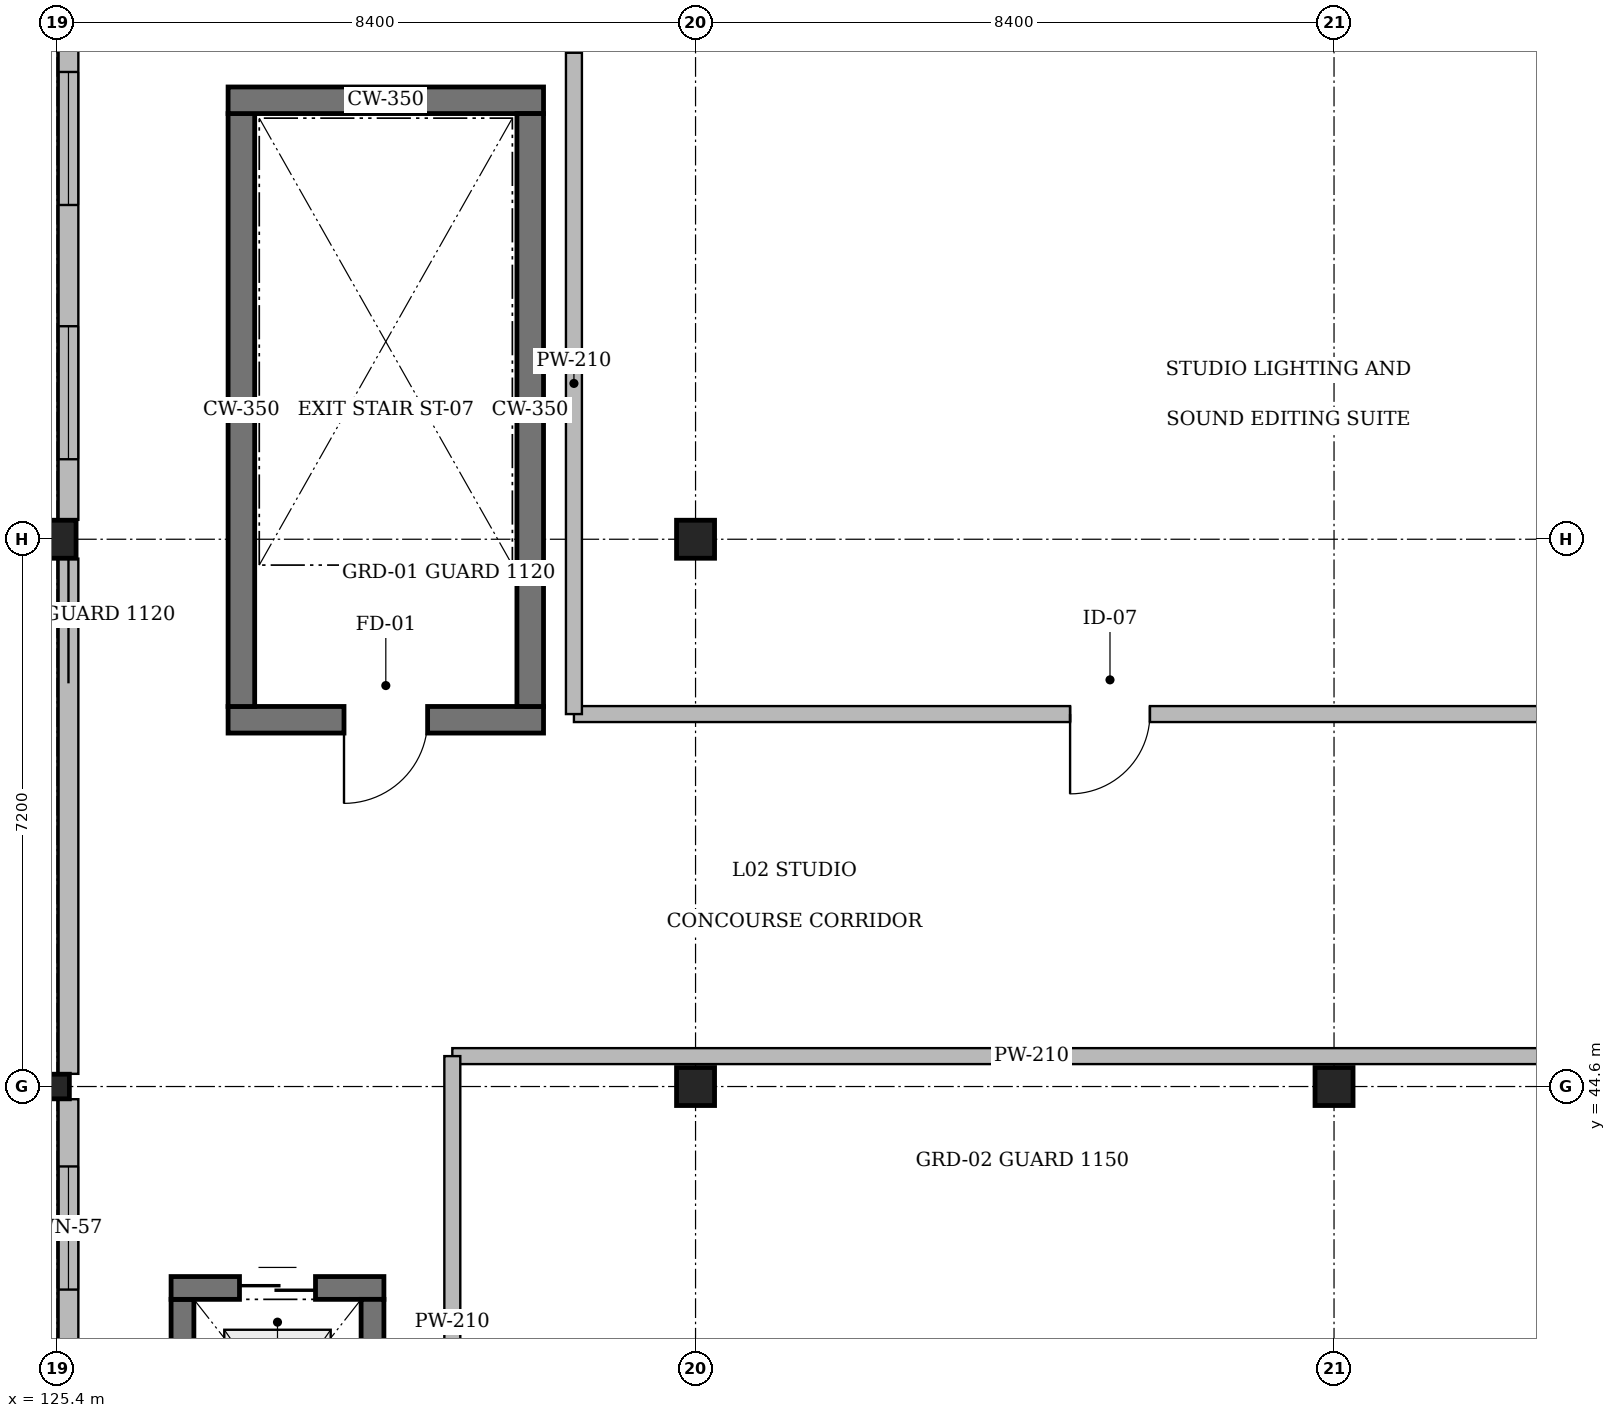
"""IFC4 building model, lengths in metres.
Left out: names, types, materials, properties, quantities, classifications, styles, units other than length and angle.
Written with IfcOpenShell. Run it as: python <this file> out.ifc"""

import sys

from ifc_helpers import new_model, si_unit, direction, frame, frame_2d, origin, origin_2d, place, context, subcontext, project, spatial, rectangle, hollow_circle, extrude, element, fill, save


model = new_model("IFC4")
c1 = context("Model", 3, precision=1e-05, world=origin(), true_north=direction((0.0, 1.0)))
c2 = subcontext(c1, "Body", "Model", "MODEL_VIEW")
j1 = project(units=[si_unit("LENGTHUNIT", "METRE"), si_unit("PLANEANGLEUNIT", "RADIAN")], contexts=[c1])
p1 = place(None, origin())
s1 = spatial("IfcSite", under=j1, at=p1, CompositionType="ELEMENT")
p2 = place(p1, origin())
s2 = spatial("IfcBuilding", under=s1, at=p2, CompositionType="ELEMENT")
p3 = place(p2, frame((0.0, 0.0, 9.0)))
s3 = spatial("IfcBuildingStorey", under=s2, at=p3, CompositionType="ELEMENT", Elevation=9.0)
p4 = place(p3, frame((125.4, 44.6, 0.0), z_axis=(0.0, 0.0, 1.0), x_axis=(1.0, 0.0, 0.0)))
e1 = element("IfcColumn", 1, at=p4, inside=s3, PredefinedType="COLUMN", context=c2, shape_type="SweptSolid", body=[
    extrude(hollow_circle(Radius=0.162, WallThickness=0.012, at=origin_2d()), origin(), (0.0, 0.0, 1.0), 4.06),
])
for number, where, z_axis, x_axis in (
    (2, (125.4, 51.8, 0.0), (0.0, 0.0, 1.0), (1.0, 0.0, 0.0)),
    (3, (133.8, 44.6, 0.0), (0.0, 0.0, 1.0), (1.0, 0.0, 0.0)),
    (4, (133.8, 51.8, 0.0), (0.0, 0.0, 1.0), (1.0, 0.0, 0.0)),
    (5, (142.2, 44.6, 0.0), (0.0, 0.0, 1.0), (1.0, 0.0, 0.0)),
):
    element("IfcColumn", number, at=place(p3, frame(where, z_axis=z_axis, x_axis=x_axis)), inside=s3, PredefinedType="COLUMN", context=c2, shape_type="SweptSolid", body=[
        extrude(rectangle(XDim=0.5, YDim=0.5, at=origin_2d()), origin(), (0.0, 0.0, 1.0), 4.06),
    ])
p5 = place(p3, frame((131.8, 49.425, 0.0), z_axis=(0.0, 0.0, 1.0), x_axis=(-1.0, 0.0, 0.0)))
e6 = element("IfcWall", 6, at=p5, inside=s3, PredefinedType="SOLIDWALL", context=c2, shape_type="SweptSolid", body=[
    extrude(rectangle(XDim=4.15, YDim=0.35, at=frame_2d((2.075, 0.0))), origin(), (0.0, 0.0, 1.0), 4.0),
])
p6 = place(p5, frame((1.525, 0.0, 0.0)))
e7 = element("IfcOpeningElement", 7, at=p6, cuts=e6, PredefinedType="OPENING", context=c2, shape_type="SweptSolid", body=[
    extrude(rectangle(XDim=1.1, YDim=2.15, at=frame_2d((0.55, 1.075))), frame((0.0, 0.195, 0.0), z_axis=(0.0, -1.0, 0.0), x_axis=(1.0, 0.0, 0.0)), (0.0, 0.0, 1.0), 0.39),
])
p7 = place(p3, frame((127.825, 49.6, 0.0), z_axis=(0.0, 0.0, 1.0), x_axis=(0.0, 1.0, 0.0)))
e8 = element("IfcWall", 8, at=p7, inside=s3, PredefinedType="SOLIDWALL", context=c2, shape_type="SweptSolid", body=[
    extrude(rectangle(XDim=7.8, YDim=0.35, at=frame_2d((3.9, 0.0))), origin(), (0.0, 0.0, 1.0), 4.0),
])
p8 = place(p3, frame((127.65, 57.575, 0.0), z_axis=(0.0, 0.0, 1.0), x_axis=(1.0, 0.0, 0.0)))
e9 = element("IfcWall", 9, at=p8, inside=s3, PredefinedType="SOLIDWALL", context=c2, shape_type="SweptSolid", body=[
    extrude(rectangle(XDim=4.15, YDim=0.35, at=frame_2d((2.075, 0.0))), origin(), (0.0, 0.0, 1.0), 4.0),
])
p9 = place(p3, frame((131.625, 57.4, 0.0), z_axis=(0.0, 0.0, 1.0), x_axis=(0.0, -1.0, 0.0)))
e10 = element("IfcWall", 10, at=p9, inside=s3, PredefinedType="SOLIDWALL", context=c2, shape_type="SweptSolid", body=[
    extrude(rectangle(XDim=7.8, YDim=0.35, at=frame_2d((3.9, 0.0))), origin(), (0.0, 0.0, 1.0), 4.0),
])
p10 = place(p3, frame((127.05, 39.0, 0.0), z_axis=(0.0, 0.0, 1.0), x_axis=(0.0, 1.0, 0.0)))
e11 = element("IfcWall", 11, at=p10, inside=s3, PredefinedType="SOLIDWALL", context=c2, shape_type="SweptSolid", body=[
    extrude(rectangle(XDim=2.8, YDim=0.3, at=frame_2d((1.4, 0.0))), origin(), (0.0, 0.0, 1.0), 4.0),
])
p11 = place(p3, frame((126.9, 41.95, 0.0), z_axis=(0.0, 0.0, 1.0), x_axis=(1.0, 0.0, 0.0)))
e12 = element("IfcWall", 12, at=p11, inside=s3, PredefinedType="SOLIDWALL", context=c2, shape_type="SweptSolid", body=[
    extrude(rectangle(XDim=2.8, YDim=0.3, at=frame_2d((1.4, 0.0))), origin(), (0.0, 0.0, 1.0), 4.0),
])
p12 = place(p11, frame((0.9, 0.0, 0.0)))
e13 = element("IfcOpeningElement", 13, at=p12, cuts=e12, PredefinedType="OPENING", context=c2, shape_type="SweptSolid", body=[
    extrude(rectangle(XDim=1.0, YDim=2.15, at=frame_2d((0.5, 1.075))), frame((0.0, 0.17, 0.0), z_axis=(0.0, -1.0, 0.0), x_axis=(1.0, 0.0, 0.0)), (0.0, 0.0, 1.0), 0.34),
])
p13 = place(p3, frame((129.55, 41.8, 0.0), z_axis=(0.0, 0.0, 1.0), x_axis=(0.0, -1.0, 0.0)))
e14 = element("IfcWall", 14, at=p13, inside=s3, PredefinedType="SOLIDWALL", context=c2, shape_type="SweptSolid", body=[
    extrude(rectangle(XDim=2.8, YDim=0.3, at=frame_2d((1.4, 0.0))), origin(), (0.0, 0.0, 1.0), 4.0),
])
p14 = place(p3, frame((125.55, 37.655, 0.0), z_axis=(0.0, 0.0, 1.0), x_axis=(0.0, 1.0, 0.0)))
e15 = element("IfcWall", 15, at=p14, inside=s3, PredefinedType="SOLIDWALL", context=c2, shape_type="SweptSolid", body=[
    extrude(rectangle(XDim=6.778, YDim=0.26, at=frame_2d((3.389, 0.0))), origin(), (0.0, 0.0, 1.0), 3.673),
])
p15 = place(p14, frame((0.885, 0.0, 0.95)))
e16 = element("IfcOpeningElement", 16, at=p15, cuts=e15, PredefinedType="OPENING", context=c2, shape_type="SweptSolid", body=[
    extrude(rectangle(XDim=1.62, YDim=1.75, at=frame_2d((0.81, 0.875))), frame((0.0, 0.15, 0.0), z_axis=(0.0, -1.0, 0.0), x_axis=(1.0, 0.0, 0.0)), (0.0, 0.0, 1.0), 0.3),
])
p16 = place(p14, frame((4.274, 0.0, 0.95)))
e17 = element("IfcOpeningElement", 17, at=p16, cuts=e15, PredefinedType="OPENING", context=c2, shape_type="SweptSolid", body=[
    extrude(rectangle(XDim=1.62, YDim=1.75, at=frame_2d((0.81, 0.875))), frame((0.0, 0.15, 0.0), z_axis=(0.0, -1.0, 0.0), x_axis=(1.0, 0.0, 0.0)), (0.0, 0.0, 1.0), 0.3),
])
p17 = place(p3, frame((125.55, 44.767, 0.0), z_axis=(0.0, 0.0, 1.0), x_axis=(0.0, 1.0, 0.0)))
e18 = element("IfcWall", 18, at=p17, inside=s3, PredefinedType="SOLIDWALL", context=c2, shape_type="SweptSolid", body=[
    extrude(rectangle(XDim=6.778, YDim=0.26, at=frame_2d((3.389, 0.0))), origin(), (0.0, 0.0, 1.0), 0.785),
])
p18 = place(p3, frame((125.55, 52.055, 0.0), z_axis=(0.0, 0.0, 1.0), x_axis=(0.0, 1.0, 0.0)))
e19 = element("IfcWall", 19, at=p18, inside=s3, PredefinedType="SOLIDWALL", context=c2, shape_type="SweptSolid", body=[
    extrude(rectangle(XDim=6.69, YDim=0.26, at=frame_2d((3.345, 0.0))), origin(), (0.0, 0.0, 1.0), 3.673),
])
p19 = place(p18, frame((0.798, 0.0, 0.95)))
e20 = element("IfcOpeningElement", 20, at=p19, cuts=e19, PredefinedType="OPENING", context=c2, shape_type="SweptSolid", body=[
    extrude(rectangle(XDim=1.75, YDim=1.65, at=frame_2d((0.875, 0.825))), frame((0.0, 0.15, 0.0), z_axis=(0.0, -1.0, 0.0), x_axis=(1.0, 0.0, 0.0)), (0.0, 0.0, 1.0), 0.3),
])
p20 = place(p18, frame((4.143, 0.0, 0.95)))
e21 = element("IfcOpeningElement", 21, at=p20, cuts=e19, PredefinedType="OPENING", context=c2, shape_type="SweptSolid", body=[
    extrude(rectangle(XDim=1.75, YDim=1.65, at=frame_2d((0.875, 0.825))), frame((0.0, 0.15, 0.0), z_axis=(0.0, -1.0, 0.0), x_axis=(1.0, 0.0, 0.0)), (0.0, 0.0, 1.0), 0.3),
])
p21 = place(p3, frame((130.6, 45.0, 0.0), z_axis=(0.0, 0.0, 1.0), x_axis=(1.0, 0.0, 0.0)))
e22 = element("IfcWall", 22, at=p21, inside=s3, PredefinedType="PARTITIONING", context=c2, shape_type="SweptSolid", body=[
    extrude(rectangle(XDim=22.6, YDim=0.21, at=frame_2d((11.3, 0.0))), origin(), (0.0, 0.0, 1.0), 3.96),
])
p22 = place(p21, frame((15.243, 0.0, 0.0)))
e23 = element("IfcOpeningElement", 23, at=p22, cuts=e22, PredefinedType="OPENING", context=c2, shape_type="SweptSolid", body=[
    extrude(rectangle(XDim=1.05, YDim=2.15, at=frame_2d((0.525, 1.075))), frame((0.0, 0.125, 0.0), z_axis=(0.0, -1.0, 0.0), x_axis=(1.0, 0.0, 0.0)), (0.0, 0.0, 1.0), 0.25),
])
p23 = place(p3, frame((130.6, 38.0, 0.0), z_axis=(0.0, 0.0, 1.0), x_axis=(0.0, 1.0, 0.0)))
e24 = element("IfcWall", 24, at=p23, inside=s3, PredefinedType="PARTITIONING", context=c2, shape_type="SweptSolid", body=[
    extrude(rectangle(XDim=7.0, YDim=0.21, at=frame_2d((3.5, 0.0))), origin(), (0.0, 0.0, 1.0), 3.96),
])
p24 = place(p3, frame((151.0, 49.5, 0.0), z_axis=(0.0, 0.0, 1.0), x_axis=(-1.0, 0.0, 0.0)))
e25 = element("IfcWall", 25, at=p24, inside=s3, PredefinedType="PARTITIONING", context=c2, shape_type="SweptSolid", body=[
    extrude(rectangle(XDim=18.8, YDim=0.21, at=frame_2d((9.4, 0.0))), origin(), (0.0, 0.0, 1.0), 3.96),
])
p25 = place(p24, frame((11.222, 0.0, 0.0)))
e26 = element("IfcOpeningElement", 26, at=p25, cuts=e25, PredefinedType="OPENING", context=c2, shape_type="SweptSolid", body=[
    extrude(rectangle(XDim=1.05, YDim=2.15, at=frame_2d((0.525, 1.075))), frame((0.0, 0.125, 0.0), z_axis=(0.0, -1.0, 0.0), x_axis=(1.0, 0.0, 0.0)), (0.0, 0.0, 1.0), 0.25),
])
p26 = place(p3, frame((132.2, 49.5, 0.0), z_axis=(0.0, 0.0, 1.0), x_axis=(0.0, 1.0, 0.0)))
e27 = element("IfcWall", 27, at=p26, inside=s3, PredefinedType="PARTITIONING", context=c2, shape_type="SweptSolid", body=[
    extrude(rectangle(XDim=8.7, YDim=0.21, at=frame_2d((4.35, 0.0))), origin(), (0.0, 0.0, 1.0), 3.96),
])
p27 = place(p6, origin())
e28 = element("IfcDoor", 28, at=p27, inside=s3, OperationType="SINGLE_SWING_RIGHT", PredefinedType="DOOR", context=c2, shape_type="SweptSolid", body=[
    extrude(rectangle(XDim=1.1, YDim=2.15, at=frame_2d((0.55, 1.075))), frame((0.0, 0.025, 0.0), z_axis=(0.0, -1.0, 0.0), x_axis=(1.0, 0.0, 0.0)), (0.0, 0.0, 1.0), 0.05),
])
fill(e7, e28)
p28 = place(p12, origin())
e29 = element("IfcDoor", 29, at=p28, inside=s3, OperationType="DOUBLE_DOOR_SLIDING", PredefinedType="DOOR", context=c2, shape_type="SweptSolid", body=[
    extrude(rectangle(XDim=1.0, YDim=2.15, at=frame_2d((0.5, 1.075))), frame((0.0, 0.025, 0.0), z_axis=(0.0, -1.0, 0.0), x_axis=(1.0, 0.0, 0.0)), (0.0, 0.0, 1.0), 0.05),
])
fill(e13, e29)
p29 = place(p16, origin())
e30 = element("IfcWindow", 30, at=p29, inside=s3, PartitioningType="SINGLE_PANEL", PredefinedType="WINDOW", context=c2, shape_type="SweptSolid", body=[
    extrude(rectangle(XDim=1.62, YDim=1.75, at=frame_2d((0.81, 0.875))), frame((0.0, 0.03, 0.0), z_axis=(0.0, -1.0, 0.0), x_axis=(1.0, 0.0, 0.0)), (0.0, 0.0, 1.0), 0.06),
])
fill(e17, e30)
p30 = place(p19, origin())
e31 = element("IfcWindow", 31, at=p30, inside=s3, PartitioningType="SINGLE_PANEL", PredefinedType="WINDOW", context=c2, shape_type="SweptSolid", body=[
    extrude(rectangle(XDim=1.75, YDim=1.65, at=frame_2d((0.875, 0.825))), frame((0.0, 0.03, 0.0), z_axis=(0.0, -1.0, 0.0), x_axis=(1.0, 0.0, 0.0)), (0.0, 0.0, 1.0), 0.06),
])
fill(e20, e31)
p31 = place(p20, origin())
e32 = element("IfcWindow", 32, at=p31, inside=s3, PartitioningType="SINGLE_PANEL", PredefinedType="WINDOW", context=c2, shape_type="SweptSolid", body=[
    extrude(rectangle(XDim=1.75, YDim=1.65, at=frame_2d((0.875, 0.825))), frame((0.0, 0.03, 0.0), z_axis=(0.0, -1.0, 0.0), x_axis=(1.0, 0.0, 0.0)), (0.0, 0.0, 1.0), 0.06),
])
fill(e21, e32)
p32 = place(p25, origin())
e33 = element("IfcDoor", 33, at=p32, inside=s3, OperationType="SINGLE_SWING_RIGHT", PredefinedType="DOOR", context=c2, shape_type="SweptSolid", body=[
    extrude(rectangle(XDim=1.05, YDim=2.15, at=frame_2d((0.525, 1.075))), frame((0.0, 0.025, 0.0), z_axis=(0.0, -1.0, 0.0), x_axis=(1.0, 0.0, 0.0)), (0.0, 0.0, 1.0), 0.05),
])
fill(e26, e33)
save(model, sys.argv[1])
